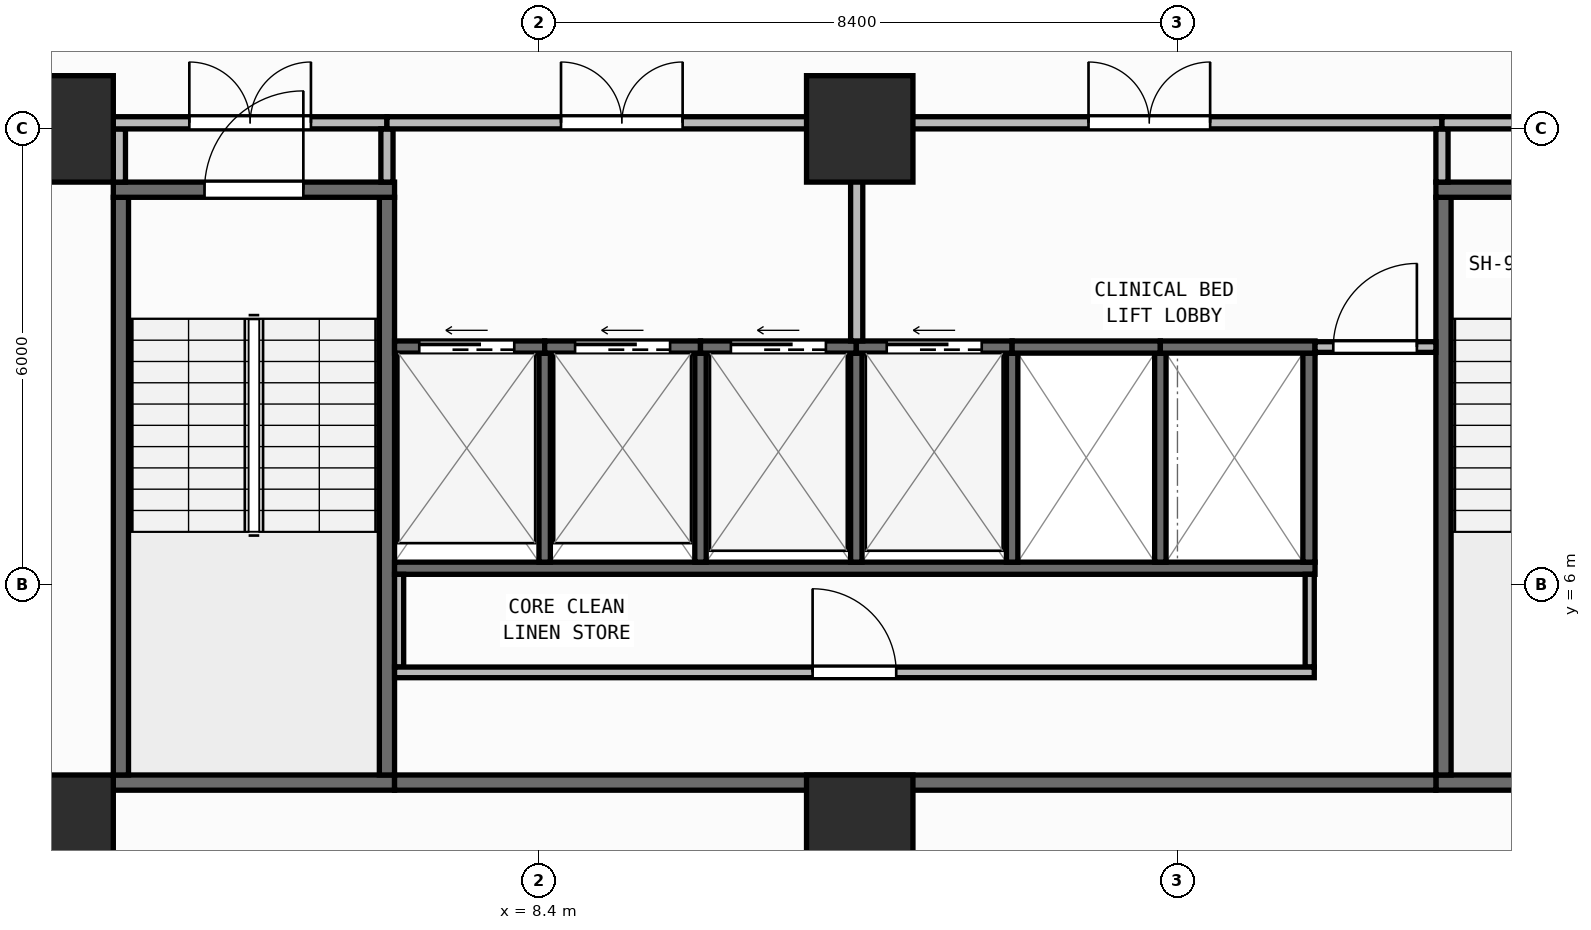
"""IFC4 building model, lengths in metres.
Left out: names, types, materials, properties, quantities, classifications, styles, units other than length and angle.
Written with IfcOpenShell. Run it as: python <this file> out.ifc"""

import sys

from ifc_helpers import new_model, si_unit, direction, frame, frame_2d, origin, origin_2d, place, context, subcontext, project, spatial, rectangle, extrude, element, fill, save


model = new_model("IFC4")
c1 = context("Model", 3, precision=1e-05, world=origin(), true_north=direction((0.0, 1.0)))
c2 = subcontext(c1, "Body", "Model", "MODEL_VIEW")
j1 = project(units=[si_unit("LENGTHUNIT", "METRE"), si_unit("PLANEANGLEUNIT", "RADIAN")], contexts=[c1])
p1 = place(None, origin())
s1 = spatial("IfcSite", under=j1, at=p1, CompositionType="ELEMENT")
p2 = place(p1, origin())
s2 = spatial("IfcBuilding", under=s1, at=p2, CompositionType="ELEMENT")
p3 = place(p2, frame((0.0, 0.0, 26.45)))
s3 = spatial("IfcBuildingStorey", under=s2, at=p3, CompositionType="ELEMENT", Elevation=26.45)
for number, where, z_axis, x_axis in (
    (1, (2.1, 2.8, 0.0), (0.0, 0.0, 1.0), (1.0, 0.0, 0.0)),
    (2, (12.62, 2.8, 0.0), (0.0, 0.0, 1.0), (1.0, 0.0, 0.0)),
    (3, (2.1, 12.0, 0.0), (0.0, 0.0, 1.0), (1.0, 0.0, 0.0)),
    (4, (12.62, 12.0, 0.0), (0.0, 0.0, 1.0), (1.0, 0.0, 0.0)),
):
    element("IfcColumn", number, at=place(p3, frame(where, z_axis=z_axis, x_axis=x_axis)), inside=s3, PredefinedType="COLUMN", context=c2, shape_type="SweptSolid", body=[
        extrude(rectangle(XDim=1.4, YDim=1.4, at=origin_2d()), origin(), (0.0, 0.0, 1.0), 3.95),
    ])
p4 = place(p3, frame((2.76, 0.174, 0.0), z_axis=(0.0, 0.0, 1.0), x_axis=(0.996571478456, 0.082736257641, 0.0)))
e5 = element("IfcWall", 5, at=p4, inside=s3, PredefinedType="STANDARD", context=c2, shape_type="SweptSolid", body=[
    extrude(rectangle(XDim=52.861, YDim=0.26, at=frame_2d((26.431, 0.0))), origin(), (0.0, 0.0, 1.0), 3.71),
])
p5 = place(p4, frame((25.231, 0.0, 0.9)))
e6 = element("IfcOpeningElement", 6, at=p5, cuts=e5, PredefinedType="OPENING", context=c2, shape_type="SweptSolid", body=[
    extrude(rectangle(XDim=2.4, YDim=1.65, at=frame_2d((1.2, 0.825))), frame((0.0, 0.14, 0.0), z_axis=(0.0, -1.0, 0.0), x_axis=(1.0, 0.0, 0.0)), (0.0, 0.0, 1.0), 0.28),
])
p6 = place(p3, frame((2.8, 3.4, 0.0), z_axis=(0.0, 0.0, 1.0), x_axis=(1.0, 0.0, 0.0)))
e7 = element("IfcWall", 7, at=p6, inside=s3, PredefinedType="SHEAR", context=c2, shape_type="SweptSolid", body=[
    extrude(rectangle(XDim=3.7, YDim=0.2, at=frame_2d((1.85, 0.0))), origin(), (0.0, 0.0, 1.0), 3.71),
])
for number, where, z_axis, x_axis in (
    (8, (2.9, 3.5, 0.0), (0.0, 0.0, 1.0), (0.0, 1.0, 0.0)),
    (9, (6.4, 3.5, 0.0), (0.0, 0.0, 1.0), (0.0, 1.0, 0.0)),
):
    element("IfcWall", number, at=place(p3, frame(where, z_axis=z_axis, x_axis=x_axis)), inside=s3, PredefinedType="SHEAR", context=c2, shape_type="SweptSolid", body=[
        extrude(rectangle(XDim=7.6, YDim=0.2, at=frame_2d((3.8, 0.0))), origin(), (0.0, 0.0, 1.0), 3.71),
    ])
p7 = place(p3, frame((2.8, 11.2, 0.0), z_axis=(0.0, 0.0, 1.0), x_axis=(1.0, 0.0, 0.0)))
e10 = element("IfcWall", 10, at=p7, inside=s3, PredefinedType="SHEAR", context=c2, shape_type="SweptSolid", body=[
    extrude(rectangle(XDim=3.7, YDim=0.2, at=frame_2d((1.85, 0.0))), origin(), (0.0, 0.0, 1.0), 3.71),
])
p8 = place(p7, frame((1.2, 0.0, 0.0)))
e11 = element("IfcOpeningElement", 11, at=p8, cuts=e10, PredefinedType="OPENING", context=c2, shape_type="SweptSolid", body=[
    extrude(rectangle(XDim=1.3, YDim=2.15, at=frame_2d((0.65, 1.075))), frame((0.0, 0.11, 0.0), z_axis=(0.0, -1.0, 0.0), x_axis=(1.0, 0.0, 0.0)), (0.0, 0.0, 1.0), 0.22),
])
p9 = place(p3, frame((20.2, 3.4, 0.0), z_axis=(0.0, 0.0, 1.0), x_axis=(1.0, 0.0, 0.0)))
e12 = element("IfcWall", 12, at=p9, inside=s3, PredefinedType="SHEAR", context=c2, shape_type="SweptSolid", body=[
    extrude(rectangle(XDim=3.7, YDim=0.2, at=frame_2d((1.85, 0.0))), origin(), (0.0, 0.0, 1.0), 3.71),
])
p10 = place(p3, frame((20.3, 3.5, 0.0), z_axis=(0.0, 0.0, 1.0), x_axis=(0.0, 1.0, 0.0)))
e13 = element("IfcWall", 13, at=p10, inside=s3, PredefinedType="SHEAR", context=c2, shape_type="SweptSolid", body=[
    extrude(rectangle(XDim=7.6, YDim=0.2, at=frame_2d((3.8, 0.0))), origin(), (0.0, 0.0, 1.0), 3.71),
])
p11 = place(p3, frame((20.2, 11.2, 0.0), z_axis=(0.0, 0.0, 1.0), x_axis=(1.0, 0.0, 0.0)))
e14 = element("IfcWall", 14, at=p11, inside=s3, PredefinedType="SHEAR", context=c2, shape_type="SweptSolid", body=[
    extrude(rectangle(XDim=3.7, YDim=0.2, at=frame_2d((1.85, 0.0))), origin(), (0.0, 0.0, 1.0), 3.71),
])
p12 = place(p11, frame((1.2, 0.0, 0.0)))
e15 = element("IfcOpeningElement", 15, at=p12, cuts=e14, PredefinedType="OPENING", context=c2, shape_type="SweptSolid", body=[
    extrude(rectangle(XDim=1.3, YDim=2.15, at=frame_2d((0.65, 1.075))), frame((0.0, 0.11, 0.0), z_axis=(0.0, -1.0, 0.0), x_axis=(1.0, 0.0, 0.0)), (0.0, 0.0, 1.0), 0.22),
])
p13 = place(p3, frame((6.5, 3.4, 0.0), z_axis=(0.0, 0.0, 1.0), x_axis=(1.0, 0.0, 0.0)))
e16 = element("IfcWall", 16, at=p13, inside=s3, PredefinedType="SHEAR", context=c2, shape_type="SweptSolid", body=[
    extrude(rectangle(XDim=13.7, YDim=0.2, at=frame_2d((6.85, 0.0))), origin(), (0.0, 0.0, 1.0), 3.71),
])
p14 = place(p3, frame((6.5, 6.22, 0.0), z_axis=(0.0, 0.0, 1.0), x_axis=(1.0, 0.0, 0.0)))
e17 = element("IfcWall", 17, at=p14, inside=s3, PredefinedType="SHEAR", context=c2, shape_type="SweptSolid", body=[
    extrude(rectangle(XDim=12.11, YDim=0.16, at=frame_2d((6.055, 0.0))), origin(), (0.0, 0.0, 1.0), 3.71),
])
p15 = place(p3, frame((18.53, 6.3, 0.0), z_axis=(0.0, 0.0, 1.0), x_axis=(0.0, 1.0, 0.0)))
e18 = element("IfcWall", 18, at=p15, inside=s3, PredefinedType="SHEAR", context=c2, shape_type="SweptSolid", body=[
    extrude(rectangle(XDim=2.75, YDim=0.16, at=frame_2d((1.375, 0.0))), origin(), (0.0, 0.0, 1.0), 3.71),
])
for number, where, z_axis, x_axis in (
    (19, (8.475, 6.3, 0.0), (0.0, 0.0, 1.0), (0.0, 1.0, 0.0)),
    (20, (10.525, 6.3, 0.0), (0.0, 0.0, 1.0), (0.0, 1.0, 0.0)),
    (21, (12.575, 6.3, 0.0), (0.0, 0.0, 1.0), (0.0, 1.0, 0.0)),
    (22, (14.625, 6.3, 0.0), (0.0, 0.0, 1.0), (0.0, 1.0, 0.0)),
    (23, (16.575, 6.3, 0.0), (0.0, 0.0, 1.0), (0.0, 1.0, 0.0)),
):
    element("IfcWall", number, at=place(p3, frame(where, z_axis=z_axis, x_axis=x_axis)), inside=s3, PredefinedType="SHEAR", context=c2, shape_type="SweptSolid", body=[
        extrude(rectangle(XDim=2.75, YDim=0.15, at=frame_2d((1.375, 0.0))), origin(), (0.0, 0.0, 1.0), 3.71),
    ])
p16 = place(p3, frame((6.5, 9.13, 0.0), z_axis=(0.0, 0.0, 1.0), x_axis=(1.0, 0.0, 0.0)))
e24 = element("IfcWall", 24, at=p16, inside=s3, PredefinedType="SHEAR", context=c2, shape_type="SweptSolid", body=[
    extrude(rectangle(XDim=1.975, YDim=0.16, at=frame_2d((0.988, 0.0))), origin(), (0.0, 0.0, 1.0), 3.71),
])
p17 = place(p16, frame((0.325, 0.0, 0.0)))
e25 = element("IfcOpeningElement", 25, at=p17, cuts=e24, PredefinedType="OPENING", context=c2, shape_type="SweptSolid", body=[
    extrude(rectangle(XDim=1.25, YDim=2.15, at=frame_2d((0.625, 1.075))), frame((0.0, 0.09, 0.0), z_axis=(0.0, -1.0, 0.0), x_axis=(1.0, 0.0, 0.0)), (0.0, 0.0, 1.0), 0.18),
])
p18 = place(p3, frame((8.475, 9.13, 0.0), z_axis=(0.0, 0.0, 1.0), x_axis=(1.0, 0.0, 0.0)))
e26 = element("IfcWall", 26, at=p18, inside=s3, PredefinedType="SHEAR", context=c2, shape_type="SweptSolid", body=[
    extrude(rectangle(XDim=2.05, YDim=0.16, at=frame_2d((1.025, 0.0))), origin(), (0.0, 0.0, 1.0), 3.71),
])
p19 = place(p18, frame((0.4, 0.0, 0.0)))
e27 = element("IfcOpeningElement", 27, at=p19, cuts=e26, PredefinedType="OPENING", context=c2, shape_type="SweptSolid", body=[
    extrude(rectangle(XDim=1.25, YDim=2.15, at=frame_2d((0.625, 1.075))), frame((0.0, 0.09, 0.0), z_axis=(0.0, -1.0, 0.0), x_axis=(1.0, 0.0, 0.0)), (0.0, 0.0, 1.0), 0.18),
])
p20 = place(p3, frame((10.525, 9.13, 0.0), z_axis=(0.0, 0.0, 1.0), x_axis=(1.0, 0.0, 0.0)))
e28 = element("IfcWall", 28, at=p20, inside=s3, PredefinedType="SHEAR", context=c2, shape_type="SweptSolid", body=[
    extrude(rectangle(XDim=2.05, YDim=0.16, at=frame_2d((1.025, 0.0))), origin(), (0.0, 0.0, 1.0), 3.71),
])
p21 = place(p20, frame((0.4, 0.0, 0.0)))
e29 = element("IfcOpeningElement", 29, at=p21, cuts=e28, PredefinedType="OPENING", context=c2, shape_type="SweptSolid", body=[
    extrude(rectangle(XDim=1.25, YDim=2.15, at=frame_2d((0.625, 1.075))), frame((0.0, 0.09, 0.0), z_axis=(0.0, -1.0, 0.0), x_axis=(1.0, 0.0, 0.0)), (0.0, 0.0, 1.0), 0.18),
])
p22 = place(p3, frame((12.575, 9.13, 0.0), z_axis=(0.0, 0.0, 1.0), x_axis=(1.0, 0.0, 0.0)))
e30 = element("IfcWall", 30, at=p22, inside=s3, PredefinedType="SHEAR", context=c2, shape_type="SweptSolid", body=[
    extrude(rectangle(XDim=2.05, YDim=0.16, at=frame_2d((1.025, 0.0))), origin(), (0.0, 0.0, 1.0), 3.71),
])
p23 = place(p22, frame((0.4, 0.0, 0.0)))
e31 = element("IfcOpeningElement", 31, at=p23, cuts=e30, PredefinedType="OPENING", context=c2, shape_type="SweptSolid", body=[
    extrude(rectangle(XDim=1.25, YDim=2.15, at=frame_2d((0.625, 1.075))), frame((0.0, 0.09, 0.0), z_axis=(0.0, -1.0, 0.0), x_axis=(1.0, 0.0, 0.0)), (0.0, 0.0, 1.0), 0.18),
])
p24 = place(p3, frame((14.625, 9.13, 0.0), z_axis=(0.0, 0.0, 1.0), x_axis=(1.0, 0.0, 0.0)))
e32 = element("IfcWall", 32, at=p24, inside=s3, PredefinedType="SHEAR", context=c2, shape_type="SweptSolid", body=[
    extrude(rectangle(XDim=1.95, YDim=0.16, at=frame_2d((0.975, 0.0))), origin(), (0.0, 0.0, 1.0), 3.71),
])
p25 = place(p3, frame((16.575, 9.13, 0.0), z_axis=(0.0, 0.0, 1.0), x_axis=(1.0, 0.0, 0.0)))
e33 = element("IfcWall", 33, at=p25, inside=s3, PredefinedType="SHEAR", context=c2, shape_type="SweptSolid", body=[
    extrude(rectangle(XDim=2.035, YDim=0.16, at=frame_2d((1.018, 0.0))), origin(), (0.0, 0.0, 1.0), 3.71),
])
for number, where, z_axis, x_axis in (
    (34, (6.56, 4.92, 0.0), (0.0, 0.0, 1.0), (0.0, 1.0, 0.0)),
    (35, (18.54, 4.92, 0.0), (0.0, 0.0, 1.0), (0.0, 1.0, 0.0)),
):
    element("IfcWall", number, at=place(p3, frame(where, z_axis=z_axis, x_axis=x_axis)), inside=s3, PredefinedType="PARTITIONING", context=c2, shape_type="SweptSolid", body=[
        extrude(rectangle(XDim=1.22, YDim=0.12, at=frame_2d((0.61, 0.0))), origin(), (0.0, 0.0, 1.0), 3.71),
    ])
p26 = place(p3, frame((6.5, 4.85, 0.0), z_axis=(0.0, 0.0, 1.0), x_axis=(1.0, 0.0, 0.0)))
e36 = element("IfcWall", 36, at=p26, inside=s3, PredefinedType="PARTITIONING", context=c2, shape_type="SweptSolid", body=[
    extrude(rectangle(XDim=12.1, YDim=0.14, at=frame_2d((6.05, 0.0))), origin(), (0.0, 0.0, 1.0), 3.71),
])
p27 = place(p26, frame((5.5, 0.0, 0.0)))
e37 = element("IfcOpeningElement", 37, at=p27, cuts=e36, PredefinedType="OPENING", context=c2, shape_type="SweptSolid", body=[
    extrude(rectangle(XDim=1.1, YDim=2.1, at=frame_2d((0.55, 1.05))), frame((0.0, 0.08, 0.0), z_axis=(0.0, -1.0, 0.0), x_axis=(1.0, 0.0, 0.0)), (0.0, 0.0, 1.0), 0.16),
])
p28 = place(p3, frame((18.61, 9.13, 0.0), z_axis=(0.0, 0.0, 1.0), x_axis=(1.0, 0.0, 0.0)))
e38 = element("IfcWall", 38, at=p28, inside=s3, PredefinedType="PARTITIONING", context=c2, shape_type="SweptSolid", body=[
    extrude(rectangle(XDim=1.59, YDim=0.14, at=frame_2d((0.795, 0.0))), origin(), (0.0, 0.0, 1.0), 3.71),
])
p29 = place(p28, frame((0.24, 0.0, 0.0)))
e39 = element("IfcOpeningElement", 39, at=p29, cuts=e38, PredefinedType="OPENING", context=c2, shape_type="SweptSolid", body=[
    extrude(rectangle(XDim=1.1, YDim=2.1, at=frame_2d((0.55, 1.05))), frame((0.0, 0.08, 0.0), z_axis=(0.0, -1.0, 0.0), x_axis=(1.0, 0.0, 0.0)), (0.0, 0.0, 1.0), 0.16),
])
p30 = place(p3, frame((2.88, 11.3, 0.0), z_axis=(0.0, 0.0, 1.0), x_axis=(0.0, 1.0, 0.0)))
e40 = element("IfcWall", 40, at=p30, inside=s3, PredefinedType="PARTITIONING", context=c2, shape_type="SweptSolid", body=[
    extrude(rectangle(XDim=0.7, YDim=0.16, at=frame_2d((0.35, 0.0))), origin(), (0.0, 0.0, 1.0), 3.71),
])
p31 = place(p3, frame((2.8, 12.08, 0.0), z_axis=(0.0, 0.0, 1.0), x_axis=(1.0, 0.0, 0.0)))
e41 = element("IfcWall", 41, at=p31, inside=s3, PredefinedType="PARTITIONING", context=c2, shape_type="SweptSolid", body=[
    extrude(rectangle(XDim=3.6, YDim=0.16, at=frame_2d((1.8, 0.0))), origin(), (0.0, 0.0, 1.0), 3.073),
])
p32 = place(p31, frame((1.0, 0.0, 0.0)))
e42 = element("IfcOpeningElement", 42, at=p32, cuts=e41, PredefinedType="OPENING", context=c2, shape_type="SweptSolid", body=[
    extrude(rectangle(XDim=1.6, YDim=2.05, at=frame_2d((0.8, 1.025))), frame((0.0, 0.09, 0.0), z_axis=(0.0, -1.0, 0.0), x_axis=(1.0, 0.0, 0.0)), (0.0, 0.0, 1.0), 0.18),
])
p33 = place(p3, frame((6.4, 11.3, 0.0), z_axis=(0.0, 0.0, 1.0), x_axis=(0.0, 1.0, 0.0)))
e43 = element("IfcWall", 43, at=p33, inside=s3, PredefinedType="PARTITIONING", context=c2, shape_type="SweptSolid", body=[
    extrude(rectangle(XDim=0.7, YDim=0.16, at=frame_2d((0.35, 0.0))), origin(), (0.0, 0.0, 1.0), 3.71),
])
p34 = place(p3, frame((6.4, 12.08, 0.0), z_axis=(0.0, 0.0, 1.0), x_axis=(1.0, 0.0, 0.0)))
e44 = element("IfcWall", 44, at=p34, inside=s3, PredefinedType="PARTITIONING", context=c2, shape_type="SweptSolid", body=[
    extrude(rectangle(XDim=6.18, YDim=0.16, at=frame_2d((3.09, 0.0))), origin(), (0.0, 0.0, 1.0), 3.073),
])
p35 = place(p34, frame((2.29, 0.0, 0.0)))
e45 = element("IfcOpeningElement", 45, at=p35, cuts=e44, PredefinedType="OPENING", context=c2, shape_type="SweptSolid", body=[
    extrude(rectangle(XDim=1.6, YDim=2.05, at=frame_2d((0.8, 1.025))), frame((0.0, 0.09, 0.0), z_axis=(0.0, -1.0, 0.0), x_axis=(1.0, 0.0, 0.0)), (0.0, 0.0, 1.0), 0.18),
])
p36 = place(p3, frame((12.58, 9.21, 0.0), z_axis=(0.0, 0.0, 1.0), x_axis=(0.0, 1.0, 0.0)))
e46 = element("IfcWall", 46, at=p36, inside=s3, PredefinedType="PARTITIONING", context=c2, shape_type="SweptSolid", body=[
    extrude(rectangle(XDim=2.79, YDim=0.16, at=frame_2d((1.395, 0.0))), origin(), (0.0, 0.0, 1.0), 3.71),
])
p37 = place(p3, frame((12.58, 12.08, 0.0), z_axis=(0.0, 0.0, 1.0), x_axis=(1.0, 0.0, 0.0)))
e47 = element("IfcWall", 47, at=p37, inside=s3, PredefinedType="PARTITIONING", context=c2, shape_type="SweptSolid", body=[
    extrude(rectangle(XDim=7.7, YDim=0.16, at=frame_2d((3.85, 0.0))), origin(), (0.0, 0.0, 1.0), 3.073),
])
p38 = place(p37, frame((3.05, 0.0, 0.0)))
e48 = element("IfcOpeningElement", 48, at=p38, cuts=e47, PredefinedType="OPENING", context=c2, shape_type="SweptSolid", body=[
    extrude(rectangle(XDim=1.6, YDim=2.05, at=frame_2d((0.8, 1.025))), frame((0.0, 0.09, 0.0), z_axis=(0.0, -1.0, 0.0), x_axis=(1.0, 0.0, 0.0)), (0.0, 0.0, 1.0), 0.18),
])
p39 = place(p3, frame((20.28, 11.3, 0.0), z_axis=(0.0, 0.0, 1.0), x_axis=(0.0, 1.0, 0.0)))
e49 = element("IfcWall", 49, at=p39, inside=s3, PredefinedType="PARTITIONING", context=c2, shape_type="SweptSolid", body=[
    extrude(rectangle(XDim=0.7, YDim=0.16, at=frame_2d((0.35, 0.0))), origin(), (0.0, 0.0, 1.0), 3.71),
])
p40 = place(p3, frame((20.28, 12.08, 0.0), z_axis=(0.0, 0.0, 1.0), x_axis=(1.0, 0.0, 0.0)))
e50 = element("IfcWall", 50, at=p40, inside=s3, PredefinedType="PARTITIONING", context=c2, shape_type="SweptSolid", body=[
    extrude(rectangle(XDim=3.62, YDim=0.16, at=frame_2d((1.81, 0.0))), origin(), (0.0, 0.0, 1.0), 3.073),
])
p41 = place(p40, frame((1.01, 0.0, 0.0)))
e51 = element("IfcOpeningElement", 51, at=p41, cuts=e50, PredefinedType="OPENING", context=c2, shape_type="SweptSolid", body=[
    extrude(rectangle(XDim=1.6, YDim=2.05, at=frame_2d((0.8, 1.025))), frame((0.0, 0.09, 0.0), z_axis=(0.0, -1.0, 0.0), x_axis=(1.0, 0.0, 0.0)), (0.0, 0.0, 1.0), 0.18),
])
p42 = place(p8, origin())
e52 = element("IfcDoor", 52, at=p42, inside=s3, OperationType="SINGLE_SWING_RIGHT", PredefinedType="DOOR", context=c2, shape_type="SweptSolid", body=[
    extrude(rectangle(XDim=1.3, YDim=2.15, at=frame_2d((0.65, 1.075))), frame((0.0, 0.025, 0.0), z_axis=(0.0, -1.0, 0.0), x_axis=(1.0, 0.0, 0.0)), (0.0, 0.0, 1.0), 0.05),
])
fill(e11, e52)
p43 = place(p17, origin())
e53 = element("IfcDoor", 53, at=p43, inside=s3, OperationType="SLIDING_TO_LEFT", PredefinedType="DOOR", context=c2, shape_type="SweptSolid", body=[
    extrude(rectangle(XDim=1.25, YDim=2.15, at=frame_2d((0.625, 1.075))), frame((0.0, 0.025, 0.0), z_axis=(0.0, -1.0, 0.0), x_axis=(1.0, 0.0, 0.0)), (0.0, 0.0, 1.0), 0.05),
])
fill(e25, e53)
p44 = place(p19, origin())
e54 = element("IfcDoor", 54, at=p44, inside=s3, OperationType="SLIDING_TO_LEFT", PredefinedType="DOOR", context=c2, shape_type="SweptSolid", body=[
    extrude(rectangle(XDim=1.25, YDim=2.15, at=frame_2d((0.625, 1.075))), frame((0.0, 0.025, 0.0), z_axis=(0.0, -1.0, 0.0), x_axis=(1.0, 0.0, 0.0)), (0.0, 0.0, 1.0), 0.05),
])
fill(e27, e54)
p45 = place(p21, origin())
e55 = element("IfcDoor", 55, at=p45, inside=s3, OperationType="SLIDING_TO_LEFT", PredefinedType="DOOR", context=c2, shape_type="SweptSolid", body=[
    extrude(rectangle(XDim=1.25, YDim=2.15, at=frame_2d((0.625, 1.075))), frame((0.0, 0.025, 0.0), z_axis=(0.0, -1.0, 0.0), x_axis=(1.0, 0.0, 0.0)), (0.0, 0.0, 1.0), 0.05),
])
fill(e29, e55)
p46 = place(p23, origin())
e56 = element("IfcDoor", 56, at=p46, inside=s3, OperationType="SLIDING_TO_LEFT", PredefinedType="DOOR", context=c2, shape_type="SweptSolid", body=[
    extrude(rectangle(XDim=1.25, YDim=2.15, at=frame_2d((0.625, 1.075))), frame((0.0, 0.025, 0.0), z_axis=(0.0, -1.0, 0.0), x_axis=(1.0, 0.0, 0.0)), (0.0, 0.0, 1.0), 0.05),
])
fill(e31, e56)
p47 = place(p27, origin())
e57 = element("IfcDoor", 57, at=p47, inside=s3, OperationType="SINGLE_SWING_LEFT", PredefinedType="DOOR", context=c2, shape_type="SweptSolid", body=[
    extrude(rectangle(XDim=1.1, YDim=2.1, at=frame_2d((0.55, 1.05))), frame((0.0, 0.025, 0.0), z_axis=(0.0, -1.0, 0.0), x_axis=(1.0, 0.0, 0.0)), (0.0, 0.0, 1.0), 0.05),
])
fill(e37, e57)
p48 = place(p29, origin())
e58 = element("IfcDoor", 58, at=p48, inside=s3, OperationType="SINGLE_SWING_RIGHT", PredefinedType="DOOR", context=c2, shape_type="SweptSolid", body=[
    extrude(rectangle(XDim=1.1, YDim=2.1, at=frame_2d((0.55, 1.05))), frame((0.0, 0.025, 0.0), z_axis=(0.0, -1.0, 0.0), x_axis=(1.0, 0.0, 0.0)), (0.0, 0.0, 1.0), 0.05),
])
fill(e39, e58)
p49 = place(p32, origin())
e59 = element("IfcDoor", 59, at=p49, inside=s3, OperationType="DOUBLE_DOOR_SINGLE_SWING", PredefinedType="DOOR", context=c2, shape_type="SweptSolid", body=[
    extrude(rectangle(XDim=1.6, YDim=2.05, at=frame_2d((0.8, 1.025))), frame((0.0, 0.025, 0.0), z_axis=(0.0, -1.0, 0.0), x_axis=(1.0, 0.0, 0.0)), (0.0, 0.0, 1.0), 0.05),
])
fill(e42, e59)
p50 = place(p35, origin())
e60 = element("IfcDoor", 60, at=p50, inside=s3, OperationType="DOUBLE_DOOR_SINGLE_SWING", PredefinedType="DOOR", context=c2, shape_type="SweptSolid", body=[
    extrude(rectangle(XDim=1.6, YDim=2.05, at=frame_2d((0.8, 1.025))), frame((0.0, 0.025, 0.0), z_axis=(0.0, -1.0, 0.0), x_axis=(1.0, 0.0, 0.0)), (0.0, 0.0, 1.0), 0.05),
])
fill(e45, e60)
p51 = place(p38, origin())
e61 = element("IfcDoor", 61, at=p51, inside=s3, OperationType="DOUBLE_DOOR_SINGLE_SWING", PredefinedType="DOOR", context=c2, shape_type="SweptSolid", body=[
    extrude(rectangle(XDim=1.6, YDim=2.05, at=frame_2d((0.8, 1.025))), frame((0.0, 0.025, 0.0), z_axis=(0.0, -1.0, 0.0), x_axis=(1.0, 0.0, 0.0)), (0.0, 0.0, 1.0), 0.05),
])
fill(e48, e61)
save(model, sys.argv[1])
